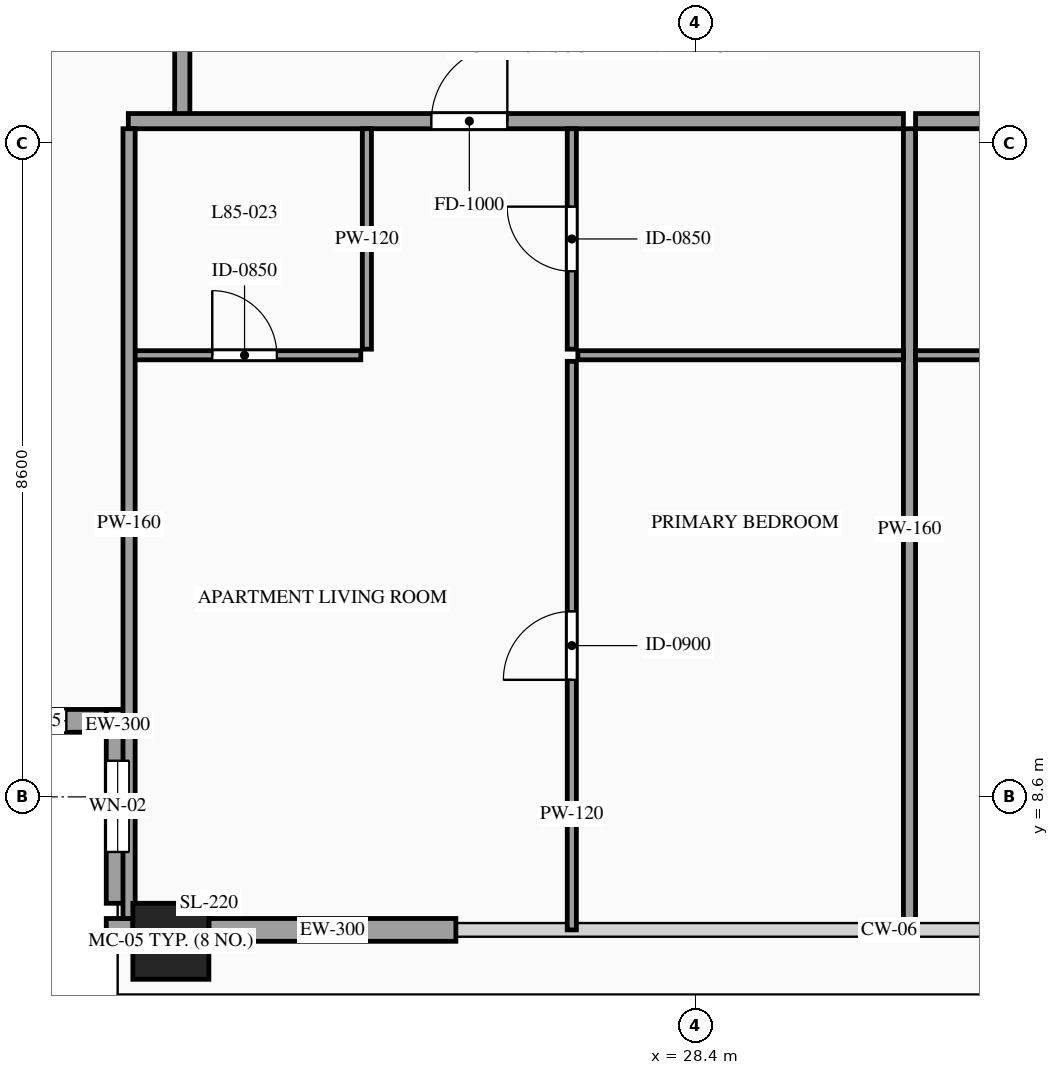
"""IFC4 building model, lengths in metres.
Left out: names, types, materials, properties, quantities, classifications, styles, units other than length and angle.
Written with IfcOpenShell. Run it as: python <this file> out.ifc"""

import sys

from ifc_helpers import new_model, si_unit, direction, frame, frame_2d, origin, origin_2d, place, context, subcontext, project, spatial, rectangle, hollow_rectangle, extrude, source, transform, mapped, element, fill, save


model = new_model("IFC4")
c1 = context("Model", 3, precision=1e-05, world=origin(), true_north=direction((0.0, 1.0)))
c2 = subcontext(c1, "Body", "Model", "MODEL_VIEW")
j1 = project(units=[si_unit("LENGTHUNIT", "METRE"), si_unit("PLANEANGLEUNIT", "RADIAN")], contexts=[c1])
p1 = place(None, origin())
s1 = spatial("IfcSite", under=j1, at=p1, CompositionType="ELEMENT")
p2 = place(p1, origin())
s2 = spatial("IfcBuilding", under=s1, at=p2, CompositionType="ELEMENT")
p3 = place(p2, frame((0.0, 0.0, 318.2)))
s3 = spatial("IfcBuildingStorey", under=s2, at=p3, CompositionType="ELEMENT", Elevation=318.2)
m1 = source(origin(), c2, "Body", "SweptSolid", [
    extrude(hollow_rectangle(XDim=1.0, YDim=1.0, WallThickness=0.048, at=origin_2d()), origin(), (0.0, 0.0, 1.0), 3.5),
])
p4 = place(p3, frame((21.5, 6.7, 0.0), z_axis=(0.0, 0.0, 1.0), x_axis=(1.0, 0.0, 0.0)))
e1 = element("IfcColumn", 1, at=p4, inside=s3, PredefinedType="COLUMN", context=c2, shape_type="MappedRepresentation", body=[
    mapped(m1, transform((0.0, 0.0, 0.0), scale=1.0)),
])
p5 = place(p3, frame((18.4, 9.6, 0.0), z_axis=(0.0, 0.0, 1.0), x_axis=(1.0, 0.0, 0.0)))
e2 = element("IfcWall", 2, at=p5, inside=s3, PredefinedType="SOLIDWALL", context=c2, shape_type="SweptSolid", body=[
    extrude(rectangle(XDim=2.55, YDim=0.3, at=frame_2d((1.275, 0.0))), origin(), (0.0, 0.0, 1.0), 3.28),
])
p6 = place(p5, frame((0.825, 0.0, 0.85)))
e3 = element("IfcOpeningElement", 3, at=p6, cuts=e2, PredefinedType="OPENING", context=c2, shape_type="SweptSolid", body=[
    extrude(rectangle(XDim=0.9, YDim=1.5, at=frame_2d((0.45, 0.75))), frame((0.0, 0.165, 0.0), z_axis=(0.0, -1.0, 0.0), x_axis=(1.0, 0.0, 0.0)), (0.0, 0.0, 1.0), 0.33),
])
p7 = place(p3, frame((20.8, 9.75, 0.0), z_axis=(0.0, 0.0, 1.0), x_axis=(0.0, -1.0, 0.0)))
e4 = element("IfcWall", 4, at=p7, inside=s3, PredefinedType="SOLIDWALL", context=c2, shape_type="SweptSolid", body=[
    extrude(rectangle(XDim=2.55, YDim=0.3, at=frame_2d((1.275, 0.0))), origin(), (0.0, 0.0, 1.0), 3.28),
])
p8 = place(p7, frame((0.675, 0.0, 0.85)))
e5 = element("IfcOpeningElement", 5, at=p8, cuts=e4, PredefinedType="OPENING", context=c2, shape_type="SweptSolid", body=[
    extrude(rectangle(XDim=1.2, YDim=2.1, at=frame_2d((0.6, 1.05))), frame((0.0, 0.165, 0.0), z_axis=(0.0, -1.0, 0.0), x_axis=(1.0, 0.0, 0.0)), (0.0, 0.0, 1.0), 0.33),
])
m2 = source(origin(), c2, "Body", "SweptSolid", [
    extrude(rectangle(XDim=0.35, YDim=0.3, at=frame_2d((0.175, 0.0))), origin(), (0.0, 0.0, 1.0), 3.28),
])
p9 = place(p3, frame((20.65, 6.85, 0.0), z_axis=(0.0, 0.0, 1.0), x_axis=(1.0, 0.0, 0.0)))
e6 = element("IfcWall", 6, at=p9, inside=s3, PredefinedType="SOLIDWALL", context=c2, shape_type="MappedRepresentation", body=[
    mapped(m2, transform((0.0, 0.0, 0.0), scale=1.0)),
])
m3 = source(origin(), c2, "Body", "SweptSolid", [
    extrude(rectangle(XDim=3.25, YDim=0.3, at=frame_2d((1.625, 0.0))), origin(), (0.0, 0.0, 1.0), 2.885),
])
p10 = place(p3, frame((22.0, 6.85, 0.0), z_axis=(0.0, 0.0, 1.0), x_axis=(1.0, 0.0, 0.0)))
e7 = element("IfcWall", 7, at=p10, inside=s3, PredefinedType="SOLIDWALL", context=c2, shape_type="MappedRepresentation", body=[
    mapped(m3, transform((0.0, 0.0, 0.0), scale=1.0)),
])
m4 = source(origin(), c2, "Body", "SweptSolid", [
    extrude(rectangle(XDim=1.7, YDim=0.2, at=frame_2d((0.85, 0.0))), origin(), (0.0, 0.0, 1.0), 3.28),
])
p11 = place(p3, frame((21.65, 17.55, 0.0), z_axis=(0.0, 0.0, 1.0), x_axis=(0.0, 1.0, 0.0)))
e8 = element("IfcWall", 8, at=p11, inside=s3, PredefinedType="PARTITIONING", context=c2, shape_type="MappedRepresentation", body=[
    mapped(m4, transform((0.0, 0.0, 0.0), scale=1.0)),
])
p12 = place(p3, frame((20.94, 17.49, 0.0), z_axis=(0.0, 0.0, 1.0), x_axis=(1.0, 0.0, 0.0)))
e9 = element("IfcWall", 9, at=p12, inside=s3, PredefinedType="PARTITIONING", context=c2, shape_type="SweptSolid", body=[
    extrude(rectangle(XDim=10.198, YDim=0.2, at=frame_2d((5.099, 0.0))), origin(), (0.0, 0.0, 1.0), 3.28),
])
p13 = place(p12, frame((3.987, 0.0, 0.0)))
e10 = element("IfcOpeningElement", 10, at=p13, cuts=e9, PredefinedType="OPENING", context=c2, shape_type="SweptSolid", body=[
    extrude(rectangle(XDim=1.0, YDim=2.2, at=frame_2d((0.5, 1.1))), frame((0.0, 0.115, 0.0), z_axis=(0.0, -1.0, 0.0), x_axis=(1.0, 0.0, 0.0)), (0.0, 0.0, 1.0), 0.23),
])
m5 = source(origin(), c2, "Body", "SweptSolid", [
    extrude(rectangle(XDim=10.54, YDim=0.16, at=frame_2d((5.27, 0.0))), origin(), (0.0, 0.0, 1.0), 3.28),
])
p14 = place(p3, frame((31.218, 6.85, 0.0), z_axis=(0.0, 0.0, 1.0), x_axis=(0.0, 1.0, 0.0)))
e11 = element("IfcWall", 11, at=p14, inside=s3, PredefinedType="PARTITIONING", context=c2, shape_type="MappedRepresentation", body=[
    mapped(m5, transform((0.0, 0.0, 0.0), scale=1.0)),
])
p15 = place(p3, frame((20.94, 14.41, 0.0), z_axis=(0.0, 0.0, 1.0), x_axis=(1.0, 0.0, 0.0)))
e12 = element("IfcWall", 12, at=p15, inside=s3, PredefinedType="PARTITIONING", context=c2, shape_type="SweptSolid", body=[
    extrude(rectangle(XDim=3.059, YDim=0.12, at=frame_2d((1.53, 0.0))), origin(), (0.0, 0.0, 1.0), 3.28),
])
p16 = place(p15, frame((1.104, 0.0, 0.0)))
e13 = element("IfcOpeningElement", 13, at=p16, cuts=e12, PredefinedType="OPENING", context=c2, shape_type="SweptSolid", body=[
    extrude(rectangle(XDim=0.85, YDim=2.1, at=frame_2d((0.425, 1.05))), frame((0.0, 0.075, 0.0), z_axis=(0.0, -1.0, 0.0), x_axis=(1.0, 0.0, 0.0)), (0.0, 0.0, 1.0), 0.15),
])
m6 = source(origin(), c2, "Body", "SweptSolid", [
    extrude(rectangle(XDim=2.9, YDim=0.12, at=frame_2d((1.45, 0.0))), origin(), (0.0, 0.0, 1.0), 3.28),
])
p17 = place(p3, frame((24.079, 14.49, 0.0), z_axis=(0.0, 0.0, 1.0), x_axis=(0.0, 1.0, 0.0)))
e14 = element("IfcWall", 14, at=p17, inside=s3, PredefinedType="PARTITIONING", context=c2, shape_type="MappedRepresentation", body=[
    mapped(m6, transform((0.0, 0.0, 0.0), scale=1.0)),
])
m7 = source(origin(), c2, "Body", "SweptSolid", [
    extrude(rectangle(XDim=4.283, YDim=0.12, at=frame_2d((2.142, 0.0))), origin(), (0.0, 0.0, 1.0), 3.28),
])
p18 = place(p3, frame((26.855, 14.41, 0.0), z_axis=(0.0, 0.0, 1.0), x_axis=(1.0, 0.0, 0.0)))
e15 = element("IfcWall", 15, at=p18, inside=s3, PredefinedType="PARTITIONING", context=c2, shape_type="MappedRepresentation", body=[
    mapped(m7, transform((0.0, 0.0, 0.0), scale=1.0)),
])
p19 = place(p3, frame((26.775, 14.49, 0.0), z_axis=(0.0, 0.0, 1.0), x_axis=(0.0, 1.0, 0.0)))
e16 = element("IfcWall", 16, at=p19, inside=s3, PredefinedType="PARTITIONING", context=c2, shape_type="SweptSolid", body=[
    extrude(rectangle(XDim=2.9, YDim=0.12, at=frame_2d((1.45, 0.0))), origin(), (0.0, 0.0, 1.0), 3.28),
])
p20 = place(p19, frame((1.025, 0.0, 0.0)))
e17 = element("IfcOpeningElement", 17, at=p20, cuts=e16, PredefinedType="OPENING", context=c2, shape_type="SweptSolid", body=[
    extrude(rectangle(XDim=0.85, YDim=2.1, at=frame_2d((0.425, 1.05))), frame((0.0, 0.075, 0.0), z_axis=(0.0, -1.0, 0.0), x_axis=(1.0, 0.0, 0.0)), (0.0, 0.0, 1.0), 0.15),
])
p21 = place(p3, frame((26.775, 6.85, 0.0), z_axis=(0.0, 0.0, 1.0), x_axis=(0.0, 1.0, 0.0)))
e18 = element("IfcWall", 18, at=p21, inside=s3, PredefinedType="PARTITIONING", context=c2, shape_type="SweptSolid", body=[
    extrude(rectangle(XDim=7.48, YDim=0.12, at=frame_2d((3.74, 0.0))), origin(), (0.0, 0.0, 1.0), 3.28),
])
p22 = place(p21, frame((3.29, 0.0, 0.0)))
e19 = element("IfcOpeningElement", 19, at=p22, cuts=e18, PredefinedType="OPENING", context=c2, shape_type="SweptSolid", body=[
    extrude(rectangle(XDim=0.9, YDim=2.15, at=frame_2d((0.45, 1.075))), frame((0.0, 0.075, 0.0), z_axis=(0.0, -1.0, 0.0), x_axis=(1.0, 0.0, 0.0)), (0.0, 0.0, 1.0), 0.15),
])
p23 = place(p3, frame((31.298, 17.49, 0.0), z_axis=(0.0, 0.0, 1.0), x_axis=(1.0, 0.0, 0.0)))
e20 = element("IfcWall", 20, at=p23, inside=s3, PredefinedType="PARTITIONING", context=c2, shape_type="SweptSolid", body=[
    extrude(rectangle(XDim=10.761, YDim=0.2, at=frame_2d((5.38, 0.0))), origin(), (0.0, 0.0, 1.0), 3.28),
])
p24 = place(p23, frame((4.234, 0.0, 0.0)))
e21 = element("IfcOpeningElement", 21, at=p24, cuts=e20, PredefinedType="OPENING", context=c2, shape_type="SweptSolid", body=[
    extrude(rectangle(XDim=1.0, YDim=2.2, at=frame_2d((0.5, 1.1))), frame((0.0, 0.115, 0.0), z_axis=(0.0, -1.0, 0.0), x_axis=(1.0, 0.0, 0.0)), (0.0, 0.0, 1.0), 0.23),
])
p25 = place(p3, frame((31.298, 14.41, 0.0), z_axis=(0.0, 0.0, 1.0), x_axis=(1.0, 0.0, 0.0)))
e22 = element("IfcWall", 22, at=p25, inside=s3, PredefinedType="PARTITIONING", context=c2, shape_type="SweptSolid", body=[
    extrude(rectangle(XDim=3.228, YDim=0.12, at=frame_2d((1.614, 0.0))), origin(), (0.0, 0.0, 1.0), 3.28),
])
p26 = place(p25, frame((1.189, 0.0, 0.0)))
e23 = element("IfcOpeningElement", 23, at=p26, cuts=e22, PredefinedType="OPENING", context=c2, shape_type="SweptSolid", body=[
    extrude(rectangle(XDim=0.85, YDim=2.1, at=frame_2d((0.425, 1.05))), frame((0.0, 0.075, 0.0), z_axis=(0.0, -1.0, 0.0), x_axis=(1.0, 0.0, 0.0)), (0.0, 0.0, 1.0), 0.15),
])
m8 = source(origin(), c2, "Body", "SweptSolid", [
    extrude(rectangle(XDim=10.39, YDim=0.16, at=frame_2d((5.195, 0.0))), origin(), (0.0, 0.0, 1.0), 3.28),
])
p27 = place(p3, frame((20.95, 7.0, 0.0), z_axis=(0.0, 0.0, 1.0), x_axis=(0.0, 1.0, 0.0)))
e24 = element("IfcWall", 24, at=p27, inside=s3, PredefinedType="PARTITIONING", context=c2, shape_type="MappedRepresentation", body=[
    mapped(m8, transform((0.0, 0.0, 0.0), scale=1.0)),
])
m9 = source(origin(), c2, "Body", "SweptSolid", [
    extrude(rectangle(XDim=0.9, YDim=1.5, at=frame_2d((0.45, 0.75))), frame((0.0, 0.03, 0.0), z_axis=(0.0, -1.0, 0.0), x_axis=(1.0, 0.0, 0.0)), (0.0, 0.0, 1.0), 0.06),
])
p28 = place(p6, origin())
e25 = element("IfcWindow", 25, at=p28, inside=s3, PartitioningType="SINGLE_PANEL", PredefinedType="WINDOW", context=c2, shape_type="MappedRepresentation", body=[
    mapped(m9, transform((0.0, 0.0, 0.0), scale=1.0)),
])
fill(e3, e25)
m10 = source(origin(), c2, "Body", "SweptSolid", [
    extrude(rectangle(XDim=1.2, YDim=2.1, at=frame_2d((0.6, 1.05))), frame((0.0, 0.03, 0.0), z_axis=(0.0, -1.0, 0.0), x_axis=(1.0, 0.0, 0.0)), (0.0, 0.0, 1.0), 0.06),
])
p29 = place(p8, origin())
e26 = element("IfcWindow", 26, at=p29, inside=s3, PartitioningType="SINGLE_PANEL", PredefinedType="WINDOW", context=c2, shape_type="MappedRepresentation", body=[
    mapped(m10, transform((0.0, 0.0, 0.0), scale=1.0)),
])
fill(e5, e26)
m11 = source(origin(), c2, "Body", "SweptSolid", [
    extrude(rectangle(XDim=1.0, YDim=2.2, at=frame_2d((0.5, 1.1))), frame((0.0, 0.025, 0.0), z_axis=(0.0, -1.0, 0.0), x_axis=(1.0, 0.0, 0.0)), (0.0, 0.0, 1.0), 0.05),
])
p30 = place(p13, origin())
e27 = element("IfcDoor", 27, at=p30, inside=s3, OperationType="SINGLE_SWING_RIGHT", PredefinedType="DOOR", context=c2, shape_type="MappedRepresentation", body=[
    mapped(m11, transform((0.0, 0.0, 0.0), scale=1.0)),
])
fill(e10, e27)
m12 = source(origin(), c2, "Body", "SweptSolid", [
    extrude(rectangle(XDim=0.85, YDim=2.1, at=frame_2d((0.425, 1.05))), frame((0.0, 0.025, 0.0), z_axis=(0.0, -1.0, 0.0), x_axis=(1.0, 0.0, 0.0)), (0.0, 0.0, 1.0), 0.05),
])
p31 = place(p16, origin())
e28 = element("IfcDoor", 28, at=p31, inside=s3, OperationType="SINGLE_SWING_LEFT", PredefinedType="DOOR", context=c2, shape_type="MappedRepresentation", body=[
    mapped(m12, transform((0.0, 0.0, 0.0), scale=1.0)),
])
fill(e13, e28)
p32 = place(p20, origin())
e29 = element("IfcDoor", 29, at=p32, inside=s3, OperationType="SINGLE_SWING_RIGHT", PredefinedType="DOOR", context=c2, shape_type="MappedRepresentation", body=[
    mapped(m12, transform((0.0, 0.0, 0.0), scale=1.0)),
])
fill(e17, e29)
m13 = source(origin(), c2, "Body", "SweptSolid", [
    extrude(rectangle(XDim=0.9, YDim=2.15, at=frame_2d((0.45, 1.075))), frame((0.0, 0.025, 0.0), z_axis=(0.0, -1.0, 0.0), x_axis=(1.0, 0.0, 0.0)), (0.0, 0.0, 1.0), 0.05),
])
p33 = place(p22, origin())
e30 = element("IfcDoor", 30, at=p33, inside=s3, OperationType="SINGLE_SWING_LEFT", PredefinedType="DOOR", context=c2, shape_type="MappedRepresentation", body=[
    mapped(m13, transform((0.0, 0.0, 0.0), scale=1.0)),
])
fill(e19, e30)
save(model, sys.argv[1])
